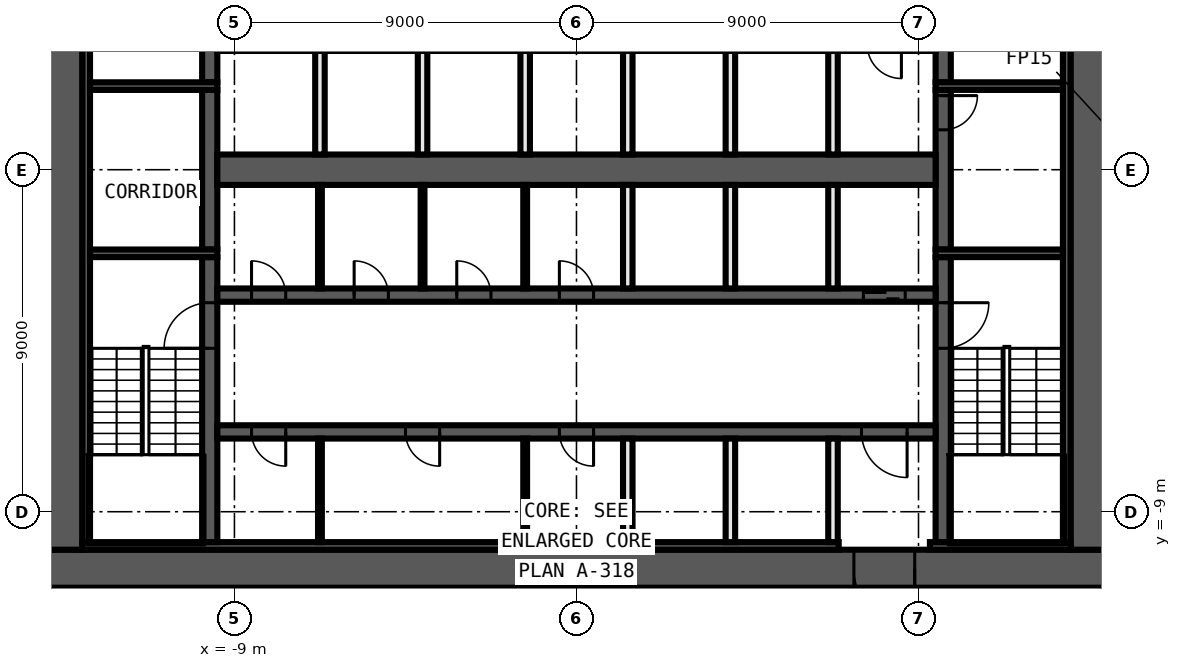
"""IFC4 building model, lengths in metres.
Left out: names, types, materials, properties, quantities, classifications, styles, units other than length and angle.
Written with IfcOpenShell. Run it as: python <this file> out.ifc"""

import sys

from ifc_helpers import new_model, si_unit, direction, frame, frame_2d, origin, place, context, subcontext, project, spatial, rectangle, extrude, element, fill, save


model = new_model("IFC4")
c1 = context("Model", 3, precision=1e-05, world=origin(), true_north=direction((0.0, 1.0)))
c2 = subcontext(c1, "Body", "Model", "MODEL_VIEW")
j1 = project(units=[si_unit("LENGTHUNIT", "METRE"), si_unit("PLANEANGLEUNIT", "RADIAN")], contexts=[c1])
p1 = place(None, origin())
s1 = spatial("IfcSite", under=j1, at=p1, CompositionType="ELEMENT")
p2 = place(p1, origin())
s2 = spatial("IfcBuilding", under=s1, at=p2, CompositionType="ELEMENT")
p3 = place(p2, frame((0.0, 0.0, 135.9)))
s3 = spatial("IfcBuildingStorey", under=s2, at=p3, CompositionType="ELEMENT", Elevation=135.9)
p4 = place(p3, frame((14.0, -10.5, 0.0), z_axis=(0.0, 0.0, 1.0), x_axis=(-1.0, 0.0, 0.0)))
e1 = element("IfcWall", 1, at=p4, inside=s3, PredefinedType="SHEAR", context=c2, shape_type="SweptSolid", body=[
    extrude(rectangle(XDim=28.0, YDim=1.0, at=frame_2d((14.0, 0.0))), origin(), (0.0, 0.0, 1.0), 3.3),
])
p5 = place(p4, frame((5.1, 0.0, 0.0)))
e2 = element("IfcOpeningElement", 2, at=p5, cuts=e1, PredefinedType="OPENING", context=c2, shape_type="SweptSolid", body=[
    extrude(rectangle(XDim=1.6, YDim=2.1, at=frame_2d((0.8, 1.05))), frame((0.0, 0.51, 0.0), z_axis=(0.0, -1.0, 0.0), x_axis=(1.0, 0.0, 0.0)), (0.0, 0.0, 1.0), 1.02),
])
for number, where, z_axis, x_axis in (
    (3, (13.5, 10.0, 0.0), (0.0, 0.0, 1.0), (0.0, -1.0, 0.0)),
    (4, (-13.5, -10.0, 0.0), (0.0, 0.0, 1.0), (0.0, 1.0, 0.0)),
):
    element("IfcWall", number, at=place(p3, frame(where, z_axis=z_axis, x_axis=x_axis)), inside=s3, PredefinedType="SHEAR", context=c2, shape_type="SweptSolid", body=[
        extrude(rectangle(XDim=20.0, YDim=1.0, at=frame_2d((10.0, 0.0))), origin(), (0.0, 0.0, 1.0), 3.3),
    ])
p6 = place(p3, frame((13.0, -9.9, 0.0), z_axis=(0.0, 0.0, 1.0), x_axis=(-1.0, 0.0, 0.0)))
e5 = element("IfcWall", 5, at=p6, inside=s3, PredefinedType="SHEAR", context=c2, shape_type="SweptSolid", body=[
    extrude(rectangle(XDim=3.7, YDim=0.2, at=frame_2d((1.85, 0.0))), origin(), (0.0, 0.0, 1.0), 3.3),
])
p7 = place(p3, frame((6.9, -9.9, 0.0), z_axis=(0.0, 0.0, 1.0), x_axis=(-1.0, 0.0, 0.0)))
e6 = element("IfcWall", 6, at=p7, inside=s3, PredefinedType="SHEAR", context=c2, shape_type="SweptSolid", body=[
    extrude(rectangle(XDim=19.9, YDim=0.2, at=frame_2d((9.95, 0.0))), origin(), (0.0, 0.0, 1.0), 3.3),
])
for number, where, z_axis, x_axis in (
    (7, (12.9, 9.8, 0.0), (0.0, 0.0, 1.0), (0.0, -1.0, 0.0)),
    (8, (-12.9, -9.8, 0.0), (0.0, 0.0, 1.0), (0.0, 1.0, 0.0)),
):
    element("IfcWall", number, at=place(p3, frame(where, z_axis=z_axis, x_axis=x_axis)), inside=s3, PredefinedType="SHEAR", context=c2, shape_type="SweptSolid", body=[
        extrude(rectangle(XDim=19.6, YDim=0.2, at=frame_2d((9.8, 0.0))), origin(), (0.0, 0.0, 1.0), 3.3),
    ])
p8 = place(p3, frame((9.65, -2.3, 0.0), z_axis=(0.0, 0.0, 1.0), x_axis=(0.0, -1.0, 0.0)))
e9 = element("IfcWall", 9, at=p8, inside=s3, PredefinedType="SHEAR", context=c2, shape_type="SweptSolid", body=[
    extrude(rectangle(XDim=7.5, YDim=0.4, at=frame_2d((3.75, 0.0))), origin(), (0.0, 0.0, 1.0), 3.3),
])
p9 = place(p8, frame((1.2, 0.0, 0.0)))
e10 = element("IfcOpeningElement", 10, at=p9, cuts=e9, PredefinedType="OPENING", context=c2, shape_type="SweptSolid", body=[
    extrude(rectangle(XDim=1.2, YDim=2.1, at=frame_2d((0.6, 1.05))), frame((0.0, 0.21, 0.0), z_axis=(0.0, -1.0, 0.0), x_axis=(1.0, 0.0, 0.0)), (0.0, 0.0, 1.0), 0.42),
])
p10 = place(p3, frame((9.65, 2.1, 0.0), z_axis=(0.0, 0.0, 1.0), x_axis=(0.0, -1.0, 0.0)))
e11 = element("IfcWall", 11, at=p10, inside=s3, PredefinedType="SHEAR", context=c2, shape_type="SweptSolid", body=[
    extrude(rectangle(XDim=4.2, YDim=0.4, at=frame_2d((2.1, 0.0))), origin(), (0.0, 0.0, 1.0), 3.3),
])
p11 = place(p10, frame((0.15, 0.0, 0.0)))
e12 = element("IfcOpeningElement", 12, at=p11, cuts=e11, PredefinedType="OPENING", context=c2, shape_type="SweptSolid", body=[
    extrude(rectangle(XDim=0.9, YDim=2.1, at=frame_2d((0.45, 1.05))), frame((0.0, 0.21, 0.0), z_axis=(0.0, -1.0, 0.0), x_axis=(1.0, 0.0, 0.0)), (0.0, 0.0, 1.0), 0.42),
])
p12 = place(p3, frame((9.65, 9.8, 0.0), z_axis=(0.0, 0.0, 1.0), x_axis=(0.0, -1.0, 0.0)))
e13 = element("IfcWall", 13, at=p12, inside=s3, PredefinedType="SHEAR", context=c2, shape_type="SweptSolid", body=[
    extrude(rectangle(XDim=7.5, YDim=0.4, at=frame_2d((3.75, 0.0))), origin(), (0.0, 0.0, 1.0), 3.3),
])
p13 = place(p12, frame((5.1, 0.0, 0.0)))
e14 = element("IfcOpeningElement", 14, at=p13, cuts=e13, PredefinedType="OPENING", context=c2, shape_type="SweptSolid", body=[
    extrude(rectangle(XDim=1.2, YDim=2.1, at=frame_2d((0.6, 1.05))), frame((0.0, 0.21, 0.0), z_axis=(0.0, -1.0, 0.0), x_axis=(1.0, 0.0, 0.0)), (0.0, 0.0, 1.0), 0.42),
])
p14 = place(p3, frame((-9.65, -9.8, 0.0), z_axis=(0.0, 0.0, 1.0), x_axis=(0.0, 1.0, 0.0)))
e15 = element("IfcWall", 15, at=p14, inside=s3, PredefinedType="SHEAR", context=c2, shape_type="SweptSolid", body=[
    extrude(rectangle(XDim=7.5, YDim=0.4, at=frame_2d((3.75, 0.0))), origin(), (0.0, 0.0, 1.0), 3.3),
])
p15 = place(p14, frame((5.1, 0.0, 0.0)))
e16 = element("IfcOpeningElement", 16, at=p15, cuts=e15, PredefinedType="OPENING", context=c2, shape_type="SweptSolid", body=[
    extrude(rectangle(XDim=1.2, YDim=2.1, at=frame_2d((0.6, 1.05))), frame((0.0, 0.21, 0.0), z_axis=(0.0, -1.0, 0.0), x_axis=(1.0, 0.0, 0.0)), (0.0, 0.0, 1.0), 0.42),
])
p16 = place(p3, frame((-9.65, -2.1, 0.0), z_axis=(0.0, 0.0, 1.0), x_axis=(0.0, 1.0, 0.0)))
e17 = element("IfcWall", 17, at=p16, inside=s3, PredefinedType="SHEAR", context=c2, shape_type="SweptSolid", body=[
    extrude(rectangle(XDim=4.2, YDim=0.4, at=frame_2d((2.1, 0.0))), origin(), (0.0, 0.0, 1.0), 3.3),
])
p17 = place(p3, frame((-9.65, 2.3, 0.0), z_axis=(0.0, 0.0, 1.0), x_axis=(0.0, 1.0, 0.0)))
e18 = element("IfcWall", 18, at=p17, inside=s3, PredefinedType="SHEAR", context=c2, shape_type="SweptSolid", body=[
    extrude(rectangle(XDim=7.5, YDim=0.4, at=frame_2d((3.75, 0.0))), origin(), (0.0, 0.0, 1.0), 3.3),
])
p18 = place(p17, frame((1.2, 0.0, 0.0)))
e19 = element("IfcOpeningElement", 19, at=p18, cuts=e18, PredefinedType="OPENING", context=c2, shape_type="SweptSolid", body=[
    extrude(rectangle(XDim=1.2, YDim=2.1, at=frame_2d((0.6, 1.05))), frame((0.0, 0.21, 0.0), z_axis=(0.0, -1.0, 0.0), x_axis=(1.0, 0.0, 0.0)), (0.0, 0.0, 1.0), 0.42),
])
for number, where, z_axis, x_axis in (
    (20, (9.45, 2.2, 0.0), (0.0, 0.0, 1.0), (1.0, 0.0, 0.0)),
    (21, (-9.45, 2.2, 0.0), (0.0, 0.0, 1.0), (-1.0, 0.0, 0.0)),
    (22, (9.45, -2.2, 0.0), (0.0, 0.0, 1.0), (1.0, 0.0, 0.0)),
    (23, (-9.45, -2.2, 0.0), (0.0, 0.0, 1.0), (-1.0, 0.0, 0.0)),
):
    element("IfcWall", number, at=place(p3, frame(where, z_axis=z_axis, x_axis=x_axis)), inside=s3, PredefinedType="SHEAR", context=c2, shape_type="SweptSolid", body=[
        extrude(rectangle(XDim=3.35, YDim=0.2, at=frame_2d((1.675, 0.0))), origin(), (0.0, 0.0, 1.0), 3.3),
    ])
p19 = place(p3, frame((-9.45, -3.3, 0.0), z_axis=(0.0, 0.0, 1.0), x_axis=(1.0, 0.0, 0.0)))
e24 = element("IfcWall", 24, at=p19, inside=s3, PredefinedType="SHEAR", context=c2, shape_type="SweptSolid", body=[
    extrude(rectangle(XDim=18.9, YDim=0.35, at=frame_2d((9.45, 0.0))), origin(), (0.0, 0.0, 1.0), 3.3),
])
p20 = place(p19, frame((17.0, 0.0, 0.0)))
e25 = element("IfcOpeningElement", 25, at=p20, cuts=e24, PredefinedType="OPENING", context=c2, shape_type="SweptSolid", body=[
    extrude(rectangle(XDim=1.1, YDim=2.1, at=frame_2d((0.55, 1.05))), frame((0.0, 0.185, 0.0), z_axis=(0.0, -1.0, 0.0), x_axis=(1.0, 0.0, 0.0)), (0.0, 0.0, 1.0), 0.37),
])
p21 = place(p19, frame((0.9, 0.0, 0.0)))
e26 = element("IfcOpeningElement", 26, at=p21, cuts=e24, PredefinedType="OPENING", context=c2, shape_type="SweptSolid", body=[
    extrude(rectangle(XDim=0.9, YDim=2.1, at=frame_2d((0.45, 1.05))), frame((0.0, 0.185, 0.0), z_axis=(0.0, -1.0, 0.0), x_axis=(1.0, 0.0, 0.0)), (0.0, 0.0, 1.0), 0.37),
])
p22 = place(p19, frame((3.6, 0.0, 0.0)))
e27 = element("IfcOpeningElement", 27, at=p22, cuts=e24, PredefinedType="OPENING", context=c2, shape_type="SweptSolid", body=[
    extrude(rectangle(XDim=0.9, YDim=2.1, at=frame_2d((0.45, 1.05))), frame((0.0, 0.185, 0.0), z_axis=(0.0, -1.0, 0.0), x_axis=(1.0, 0.0, 0.0)), (0.0, 0.0, 1.0), 0.37),
])
p23 = place(p19, frame((6.3, 0.0, 0.0)))
e28 = element("IfcOpeningElement", 28, at=p23, cuts=e24, PredefinedType="OPENING", context=c2, shape_type="SweptSolid", body=[
    extrude(rectangle(XDim=0.9, YDim=2.1, at=frame_2d((0.45, 1.05))), frame((0.0, 0.185, 0.0), z_axis=(0.0, -1.0, 0.0), x_axis=(1.0, 0.0, 0.0)), (0.0, 0.0, 1.0), 0.37),
])
p24 = place(p19, frame((9.0, 0.0, 0.0)))
e29 = element("IfcOpeningElement", 29, at=p24, cuts=e24, PredefinedType="OPENING", context=c2, shape_type="SweptSolid", body=[
    extrude(rectangle(XDim=0.9, YDim=2.1, at=frame_2d((0.45, 1.05))), frame((0.0, 0.185, 0.0), z_axis=(0.0, -1.0, 0.0), x_axis=(1.0, 0.0, 0.0)), (0.0, 0.0, 1.0), 0.37),
])
p25 = place(p3, frame((9.45, -6.9, 0.0), z_axis=(0.0, 0.0, 1.0), x_axis=(-1.0, 0.0, 0.0)))
e30 = element("IfcWall", 30, at=p25, inside=s3, PredefinedType="SHEAR", context=c2, shape_type="SweptSolid", body=[
    extrude(rectangle(XDim=18.9, YDim=0.35, at=frame_2d((9.45, 0.0))), origin(), (0.0, 0.0, 1.0), 3.3),
])
p26 = place(p25, frame((0.75, 0.0, 0.0)))
e31 = element("IfcOpeningElement", 31, at=p26, cuts=e30, PredefinedType="OPENING", context=c2, shape_type="SweptSolid", body=[
    extrude(rectangle(XDim=1.2, YDim=2.1, at=frame_2d((0.6, 1.05))), frame((0.0, 0.185, 0.0), z_axis=(0.0, -1.0, 0.0), x_axis=(1.0, 0.0, 0.0)), (0.0, 0.0, 1.0), 0.37),
])
p27 = place(p25, frame((17.1, 0.0, 0.0)))
e32 = element("IfcOpeningElement", 32, at=p27, cuts=e30, PredefinedType="OPENING", context=c2, shape_type="SweptSolid", body=[
    extrude(rectangle(XDim=0.9, YDim=2.1, at=frame_2d((0.45, 1.05))), frame((0.0, 0.185, 0.0), z_axis=(0.0, -1.0, 0.0), x_axis=(1.0, 0.0, 0.0)), (0.0, 0.0, 1.0), 0.37),
])
p28 = place(p25, frame((13.05, 0.0, 0.0)))
e33 = element("IfcOpeningElement", 33, at=p28, cuts=e30, PredefinedType="OPENING", context=c2, shape_type="SweptSolid", body=[
    extrude(rectangle(XDim=0.9, YDim=2.1, at=frame_2d((0.45, 1.05))), frame((0.0, 0.185, 0.0), z_axis=(0.0, -1.0, 0.0), x_axis=(1.0, 0.0, 0.0)), (0.0, 0.0, 1.0), 0.37),
])
p29 = place(p25, frame((9.0, 0.0, 0.0)))
e34 = element("IfcOpeningElement", 34, at=p29, cuts=e30, PredefinedType="OPENING", context=c2, shape_type="SweptSolid", body=[
    extrude(rectangle(XDim=0.9, YDim=2.1, at=frame_2d((0.45, 1.05))), frame((0.0, 0.185, 0.0), z_axis=(0.0, -1.0, 0.0), x_axis=(1.0, 0.0, 0.0)), (0.0, 0.0, 1.0), 0.37),
])
p30 = place(p3, frame((-9.45, 0.0, 0.0), z_axis=(0.0, 0.0, 1.0), x_axis=(1.0, 0.0, 0.0)))
e35 = element("IfcWall", 35, at=p30, inside=s3, PredefinedType="SHEAR", context=c2, shape_type="SweptSolid", body=[
    extrude(rectangle(XDim=18.9, YDim=0.8, at=frame_2d((9.45, 0.0))), origin(), (0.0, 0.0, 1.0), 3.3),
])
for number, where, z_axis, x_axis in (
    (36, (6.75, -9.8, 0.0), (0.0, 0.0, 1.0), (0.0, 1.0, 0.0)),
    (37, (6.75, -3.125, 0.0), (0.0, 0.0, 1.0), (0.0, 1.0, 0.0)),
    (38, (6.75, 0.4, 0.0), (0.0, 0.0, 1.0), (0.0, 1.0, 0.0)),
    (39, (4.05, -9.8, 0.0), (0.0, 0.0, 1.0), (0.0, 1.0, 0.0)),
    (40, (4.05, -3.125, 0.0), (0.0, 0.0, 1.0), (0.0, 1.0, 0.0)),
    (41, (4.05, 0.4, 0.0), (0.0, 0.0, 1.0), (0.0, 1.0, 0.0)),
    (42, (1.35, -9.8, 0.0), (0.0, 0.0, 1.0), (0.0, 1.0, 0.0)),
    (43, (1.35, -3.125, 0.0), (0.0, 0.0, 1.0), (0.0, 1.0, 0.0)),
    (44, (1.35, 0.4, 0.0), (0.0, 0.0, 1.0), (0.0, 1.0, 0.0)),
):
    element("IfcWall", number, at=place(p3, frame(where, z_axis=z_axis, x_axis=x_axis)), inside=s3, PredefinedType="SOLIDWALL", context=c2, shape_type="SweptSolid", body=[
        extrude(rectangle(XDim=2.725, YDim=0.25, at=frame_2d((1.363, 0.0))), origin(), (0.0, 0.0, 1.0), 3.3),
    ])
for number, where, z_axis, x_axis in (
    (45, (-1.35, -9.8, 0.0), (0.0, 0.0, 1.0), (0.0, 1.0, 0.0)),
    (46, (-1.35, -3.125, 0.0), (0.0, 0.0, 1.0), (0.0, 1.0, 0.0)),
):
    element("IfcWall", number, at=place(p3, frame(where, z_axis=z_axis, x_axis=x_axis)), inside=s3, PredefinedType="PARTITIONING", context=c2, shape_type="SweptSolid", body=[
        extrude(rectangle(XDim=2.725, YDim=0.1, at=frame_2d((1.363, 0.0))), origin(), (0.0, 0.0, 1.0), 3.3),
    ])
p31 = place(p3, frame((-1.35, 0.4, 0.0), z_axis=(0.0, 0.0, 1.0), x_axis=(0.0, 1.0, 0.0)))
e47 = element("IfcWall", 47, at=p31, inside=s3, PredefinedType="SOLIDWALL", context=c2, shape_type="SweptSolid", body=[
    extrude(rectangle(XDim=2.725, YDim=0.25, at=frame_2d((1.363, 0.0))), origin(), (0.0, 0.0, 1.0), 3.3),
])
p32 = place(p3, frame((-4.05, -3.125, 0.0), z_axis=(0.0, 0.0, 1.0), x_axis=(0.0, 1.0, 0.0)))
e48 = element("IfcWall", 48, at=p32, inside=s3, PredefinedType="PARTITIONING", context=c2, shape_type="SweptSolid", body=[
    extrude(rectangle(XDim=2.725, YDim=0.1, at=frame_2d((1.363, 0.0))), origin(), (0.0, 0.0, 1.0), 3.3),
])
p33 = place(p3, frame((-4.05, 0.4, 0.0), z_axis=(0.0, 0.0, 1.0), x_axis=(0.0, 1.0, 0.0)))
e49 = element("IfcWall", 49, at=p33, inside=s3, PredefinedType="SOLIDWALL", context=c2, shape_type="SweptSolid", body=[
    extrude(rectangle(XDim=2.725, YDim=0.25, at=frame_2d((1.363, 0.0))), origin(), (0.0, 0.0, 1.0), 3.3),
])
for number, where, z_axis, x_axis in (
    (50, (-6.75, -9.8, 0.0), (0.0, 0.0, 1.0), (0.0, 1.0, 0.0)),
    (51, (-6.75, -3.125, 0.0), (0.0, 0.0, 1.0), (0.0, 1.0, 0.0)),
):
    element("IfcWall", number, at=place(p3, frame(where, z_axis=z_axis, x_axis=x_axis)), inside=s3, PredefinedType="PARTITIONING", context=c2, shape_type="SweptSolid", body=[
        extrude(rectangle(XDim=2.725, YDim=0.1, at=frame_2d((1.363, 0.0))), origin(), (0.0, 0.0, 1.0), 3.3),
    ])
p34 = place(p3, frame((-6.75, 0.4, 0.0), z_axis=(0.0, 0.0, 1.0), x_axis=(0.0, 1.0, 0.0)))
e52 = element("IfcWall", 52, at=p34, inside=s3, PredefinedType="SOLIDWALL", context=c2, shape_type="SweptSolid", body=[
    extrude(rectangle(XDim=2.725, YDim=0.25, at=frame_2d((1.363, 0.0))), origin(), (0.0, 0.0, 1.0), 3.3),
])
p35 = place(p11, origin())
e53 = element("IfcDoor", 53, at=p35, inside=s3, OperationType="SINGLE_SWING_RIGHT", PredefinedType="DOOR", context=c2, shape_type="SweptSolid", body=[
    extrude(rectangle(XDim=0.9, YDim=2.1, at=frame_2d((0.45, 1.05))), frame((0.0, 0.025, 0.0), z_axis=(0.0, -1.0, 0.0), x_axis=(1.0, 0.0, 0.0)), (0.0, 0.0, 1.0), 0.05),
])
fill(e12, e53)
p36 = place(p20, origin())
e54 = element("IfcDoor", 54, at=p36, inside=s3, OperationType="DOUBLE_DOOR_SLIDING", PredefinedType="DOOR", context=c2, shape_type="SweptSolid", body=[
    extrude(rectangle(XDim=1.1, YDim=2.1, at=frame_2d((0.55, 1.05))), frame((0.0, 0.025, 0.0), z_axis=(0.0, -1.0, 0.0), x_axis=(1.0, 0.0, 0.0)), (0.0, 0.0, 1.0), 0.05),
])
fill(e25, e54)
p37 = place(p5, origin())
e55 = element("IfcDoor", 55, at=p37, inside=s3, OperationType="DOUBLE_DOOR_SINGLE_SWING", PredefinedType="DOOR", context=c2, shape_type="SweptSolid", body=[
    extrude(rectangle(XDim=1.6, YDim=2.1, at=frame_2d((0.8, 1.05))), frame((0.0, 0.025, 0.0), z_axis=(0.0, -1.0, 0.0), x_axis=(1.0, 0.0, 0.0)), (0.0, 0.0, 1.0), 0.05),
])
fill(e2, e55)
p38 = place(p26, origin())
e56 = element("IfcDoor", 56, at=p38, inside=s3, OperationType="SINGLE_SWING_LEFT", PredefinedType="DOOR", context=c2, shape_type="SweptSolid", body=[
    extrude(rectangle(XDim=1.2, YDim=2.1, at=frame_2d((0.6, 1.05))), frame((0.0, 0.025, 0.0), z_axis=(0.0, -1.0, 0.0), x_axis=(1.0, 0.0, 0.0)), (0.0, 0.0, 1.0), 0.05),
])
fill(e31, e56)
p39 = place(p21, origin())
e57 = element("IfcDoor", 57, at=p39, inside=s3, OperationType="SINGLE_SWING_RIGHT", PredefinedType="DOOR", context=c2, shape_type="SweptSolid", body=[
    extrude(rectangle(XDim=0.9, YDim=2.1, at=frame_2d((0.45, 1.05))), frame((0.0, 0.025, 0.0), z_axis=(0.0, -1.0, 0.0), x_axis=(1.0, 0.0, 0.0)), (0.0, 0.0, 1.0), 0.05),
])
fill(e26, e57)
p40 = place(p22, origin())
e58 = element("IfcDoor", 58, at=p40, inside=s3, OperationType="SINGLE_SWING_LEFT", PredefinedType="DOOR", context=c2, shape_type="SweptSolid", body=[
    extrude(rectangle(XDim=0.9, YDim=2.1, at=frame_2d((0.45, 1.05))), frame((0.0, 0.025, 0.0), z_axis=(0.0, -1.0, 0.0), x_axis=(1.0, 0.0, 0.0)), (0.0, 0.0, 1.0), 0.05),
])
fill(e27, e58)
p41 = place(p23, origin())
e59 = element("IfcDoor", 59, at=p41, inside=s3, OperationType="SINGLE_SWING_RIGHT", PredefinedType="DOOR", context=c2, shape_type="SweptSolid", body=[
    extrude(rectangle(XDim=0.9, YDim=2.1, at=frame_2d((0.45, 1.05))), frame((0.0, 0.025, 0.0), z_axis=(0.0, -1.0, 0.0), x_axis=(1.0, 0.0, 0.0)), (0.0, 0.0, 1.0), 0.05),
])
fill(e28, e59)
p42 = place(p24, origin())
e60 = element("IfcDoor", 60, at=p42, inside=s3, OperationType="SINGLE_SWING_LEFT", PredefinedType="DOOR", context=c2, shape_type="SweptSolid", body=[
    extrude(rectangle(XDim=0.9, YDim=2.1, at=frame_2d((0.45, 1.05))), frame((0.0, 0.025, 0.0), z_axis=(0.0, -1.0, 0.0), x_axis=(1.0, 0.0, 0.0)), (0.0, 0.0, 1.0), 0.05),
])
fill(e29, e60)
p43 = place(p27, origin())
e61 = element("IfcDoor", 61, at=p43, inside=s3, OperationType="SINGLE_SWING_RIGHT", PredefinedType="DOOR", context=c2, shape_type="SweptSolid", body=[
    extrude(rectangle(XDim=0.9, YDim=2.1, at=frame_2d((0.45, 1.05))), frame((0.0, 0.025, 0.0), z_axis=(0.0, -1.0, 0.0), x_axis=(1.0, 0.0, 0.0)), (0.0, 0.0, 1.0), 0.05),
])
fill(e32, e61)
p44 = place(p28, origin())
e62 = element("IfcDoor", 62, at=p44, inside=s3, OperationType="SINGLE_SWING_LEFT", PredefinedType="DOOR", context=c2, shape_type="SweptSolid", body=[
    extrude(rectangle(XDim=0.9, YDim=2.1, at=frame_2d((0.45, 1.05))), frame((0.0, 0.025, 0.0), z_axis=(0.0, -1.0, 0.0), x_axis=(1.0, 0.0, 0.0)), (0.0, 0.0, 1.0), 0.05),
])
fill(e33, e62)
p45 = place(p29, origin())
e63 = element("IfcDoor", 63, at=p45, inside=s3, OperationType="SINGLE_SWING_RIGHT", PredefinedType="DOOR", context=c2, shape_type="SweptSolid", body=[
    extrude(rectangle(XDim=0.9, YDim=2.1, at=frame_2d((0.45, 1.05))), frame((0.0, 0.025, 0.0), z_axis=(0.0, -1.0, 0.0), x_axis=(1.0, 0.0, 0.0)), (0.0, 0.0, 1.0), 0.05),
])
fill(e34, e63)
p46 = place(p9, origin())
e64 = element("IfcDoor", 64, at=p46, inside=s3, OperationType="SINGLE_SWING_RIGHT", PredefinedType="DOOR", context=c2, shape_type="SweptSolid", body=[
    extrude(rectangle(XDim=1.2, YDim=2.1, at=frame_2d((0.6, 1.05))), frame((0.0, 0.025, 0.0), z_axis=(0.0, -1.0, 0.0), x_axis=(1.0, 0.0, 0.0)), (0.0, 0.0, 1.0), 0.05),
])
fill(e10, e64)
p47 = place(p15, origin())
e65 = element("IfcDoor", 65, at=p47, inside=s3, OperationType="SINGLE_SWING_LEFT", PredefinedType="DOOR", context=c2, shape_type="SweptSolid", body=[
    extrude(rectangle(XDim=1.2, YDim=2.1, at=frame_2d((0.6, 1.05))), frame((0.0, 0.025, 0.0), z_axis=(0.0, -1.0, 0.0), x_axis=(1.0, 0.0, 0.0)), (0.0, 0.0, 1.0), 0.05),
])
fill(e16, e65)
save(model, sys.argv[1])
